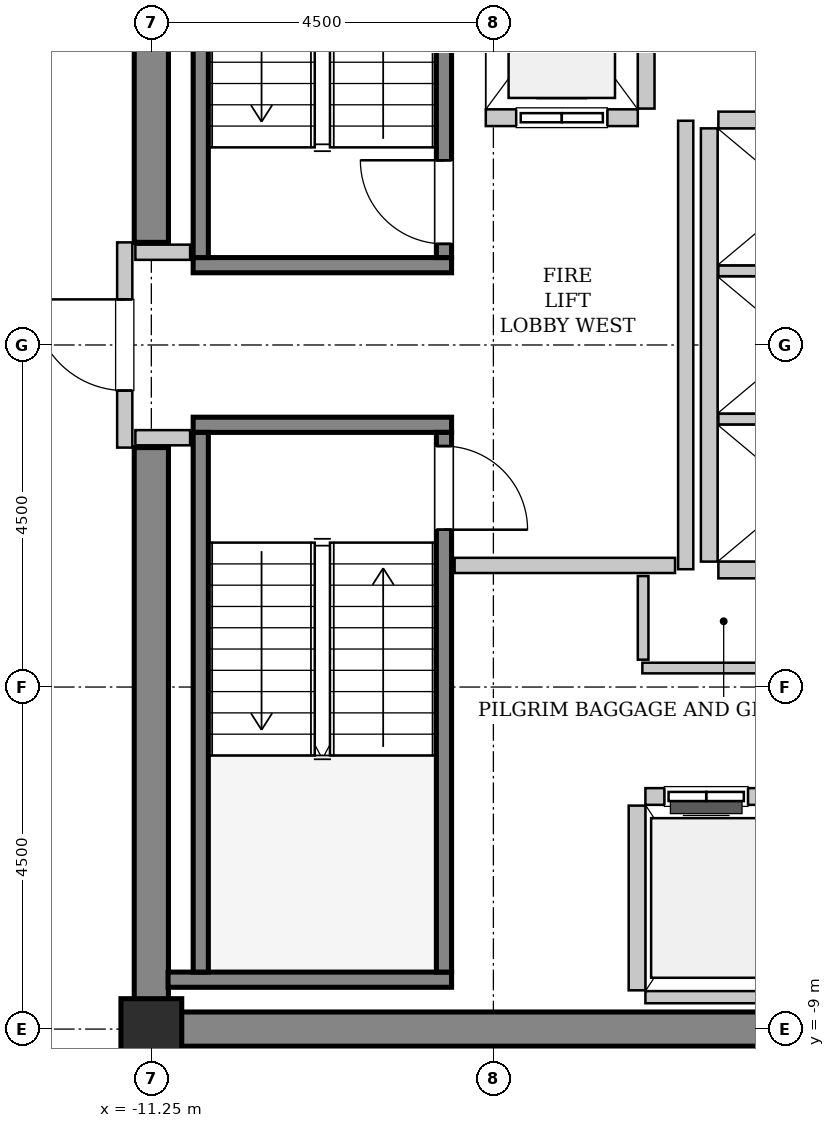
"""IFC4 building model, lengths in metres.
Left out: names, types, materials, properties, quantities, classifications, styles, units other than length and angle.
Written with IfcOpenShell. Run it as: python <this file> out.ifc"""

import sys

from ifc_helpers import new_model, si_unit, direction, frame, frame_2d, origin, origin_2d, place, context, subcontext, project, spatial, rectangle, hollow_rectangle, extrude, source, transform, mapped, element, fill, save


model = new_model("IFC4")
c1 = context("Model", 3, precision=1e-05, world=origin(), true_north=direction((0.0, 1.0)))
c2 = subcontext(c1, "Body", "Model", "MODEL_VIEW")
j1 = project(units=[si_unit("LENGTHUNIT", "METRE"), si_unit("PLANEANGLEUNIT", "RADIAN")], contexts=[c1])
p1 = place(None, origin())
s1 = spatial("IfcSite", under=j1, at=p1, CompositionType="ELEMENT")
p2 = place(p1, origin())
s2 = spatial("IfcBuilding", under=s1, at=p2, CompositionType="ELEMENT")
p3 = place(p2, frame((0.0, 0.0, 210.4)))
s3 = spatial("IfcBuildingStorey", under=s2, at=p3, CompositionType="ELEMENT", Elevation=210.4)
m1 = source(origin(), c2, "Body", "SweptSolid", [
    extrude(rectangle(XDim=9.925, YDim=0.45, at=frame_2d((4.962, 0.0))), origin(), (0.0, 0.0, 1.0), 3.8),
])
p4 = place(p3, frame((-11.475, -9.0, 0.0), z_axis=(0.0, 0.0, 1.0), x_axis=(1.0, 0.0, 0.0)))
e1 = element("IfcWall", 1, at=p4, inside=s3, PredefinedType="SHEAR", context=c2, shape_type="MappedRepresentation", body=[
    mapped(m1, transform((0.0, 0.0, 0.0), x_axis=(1.0, 0.0, 0.0), y_axis=(0.0, 1.0, 0.0), z_axis=(0.0, 0.0, 1.0), scale=1.0)),
])
m2 = source(origin(), c2, "Body", "SweptSolid", [
    extrude(rectangle(XDim=7.425, YDim=0.45, at=frame_2d((3.712, 0.0))), origin(), (0.0, 0.0, 1.0), 3.8),
])
for number, where, z_axis, x_axis in (
    (2, (-11.25, -8.775, 0.0), (0.0, 0.0, 1.0), (0.0, 1.0, 0.0)),
    (3, (-11.25, 1.35, 0.0), (0.0, 0.0, 1.0), (0.0, 1.0, 0.0)),
):
    element("IfcWall", number, at=place(p3, frame(where, z_axis=z_axis, x_axis=x_axis)), inside=s3, PredefinedType="SHEAR", context=c2, shape_type="MappedRepresentation", body=[
        mapped(m2, transform((0.0, 0.0, 0.0), x_axis=(1.0, 0.0, 0.0), y_axis=(0.0, 1.0, 0.0), z_axis=(0.0, 0.0, 1.0), scale=1.0)),
    ])
m3 = source(origin(), c2, "Body", "SweptSolid", [
    extrude(hollow_rectangle(XDim=0.8, YDim=0.8, WallThickness=0.04, InnerFilletRadius=0.04, OuterFilletRadius=0.08, at=origin_2d()), origin(), (0.0, 0.0, 1.0), 3.8),
])
p5 = place(p3, frame((-11.25, -9.0, 0.0), z_axis=(0.0, 0.0, 1.0), x_axis=(1.0, 0.0, 0.0)))
e4 = element("IfcColumn", 4, at=p5, inside=s3, PredefinedType="COLUMN", context=c2, shape_type="MappedRepresentation", body=[
    mapped(m3, transform((0.0, 0.0, 0.0), x_axis=(1.0, 0.0, 0.0), y_axis=(0.0, 1.0, 0.0), z_axis=(0.0, 0.0, 1.0), scale=1.0)),
])
m4 = source(origin(), c2, "Body", "SweptSolid", [
    extrude(rectangle(XDim=3.4, YDim=0.2, at=frame_2d((1.7, 0.0))), origin(), (0.0, 0.0, 1.0), 3.8),
])
p6 = place(p3, frame((-7.3, 1.05, 0.0), z_axis=(0.0, 0.0, 1.0), x_axis=(-1.0, 0.0, 0.0)))
e5 = element("IfcWall", 5, at=p6, inside=s3, PredefinedType="SOLIDWALL", context=c2, shape_type="MappedRepresentation", body=[
    mapped(m4, transform((0.0, 0.0, 0.0), x_axis=(1.0, 0.0, 0.0), y_axis=(0.0, 1.0, 0.0), z_axis=(0.0, 0.0, 1.0), scale=1.0)),
])
m5 = source(origin(), c2, "Body", "SweptSolid", [
    extrude(rectangle(XDim=7.1, YDim=0.2, at=frame_2d((3.55, 0.0))), origin(), (0.0, 0.0, 1.0), 3.8),
])
p7 = place(p3, frame((-7.4, 1.15, 0.0), z_axis=(0.0, 0.0, 1.0), x_axis=(0.0, 1.0, 0.0)))
e6 = element("IfcWall", 6, at=p7, inside=s3, PredefinedType="SOLIDWALL", context=c2, shape_type="MappedRepresentation", body=[
    mapped(m5, transform((0.0, 0.0, 0.0), x_axis=(1.0, 0.0, 0.0), y_axis=(0.0, 1.0, 0.0), z_axis=(0.0, 0.0, 1.0), scale=1.0)),
])
p8 = place(p7, frame((0.18, 0.0, 0.0)))
e7 = element("IfcOpeningElement", 7, at=p8, cuts=e6, PredefinedType="OPENING", context=c2, shape_type="SweptSolid", body=[
    extrude(rectangle(XDim=1.1, YDim=2.15, at=frame_2d((0.55, 1.075))), frame((0.0, 0.11, 0.0), z_axis=(0.0, -1.0, 0.0), x_axis=(1.0, 0.0, 0.0)), (0.0, 0.0, 1.0), 0.22),
])
p9 = place(p3, frame((-10.6, 1.15, 0.0), z_axis=(0.0, 0.0, 1.0), x_axis=(0.0, 1.0, 0.0)))
e8 = element("IfcWall", 8, at=p9, inside=s3, PredefinedType="SOLIDWALL", context=c2, shape_type="MappedRepresentation", body=[
    mapped(m5, transform((0.0, 0.0, 0.0), x_axis=(1.0, 0.0, 0.0), y_axis=(0.0, 1.0, 0.0), z_axis=(0.0, 0.0, 1.0), scale=1.0)),
])
p10 = place(p3, frame((-10.7, -1.05, 0.0), z_axis=(0.0, 0.0, 1.0), x_axis=(1.0, 0.0, 0.0)))
e9 = element("IfcWall", 9, at=p10, inside=s3, PredefinedType="SOLIDWALL", context=c2, shape_type="MappedRepresentation", body=[
    mapped(m4, transform((0.0, 0.0, 0.0), x_axis=(1.0, 0.0, 0.0), y_axis=(0.0, 1.0, 0.0), z_axis=(0.0, 0.0, 1.0), scale=1.0)),
])
m6 = source(origin(), c2, "Body", "SweptSolid", [
    extrude(rectangle(XDim=3.73, YDim=0.2, at=frame_2d((1.865, 0.0))), origin(), (0.0, 0.0, 1.0), 3.8),
])
p11 = place(p3, frame((-11.03, -8.35, 0.0), z_axis=(0.0, 0.0, 1.0), x_axis=(1.0, 0.0, 0.0)))
e10 = element("IfcWall", 10, at=p11, inside=s3, PredefinedType="SOLIDWALL", context=c2, shape_type="MappedRepresentation", body=[
    mapped(m6, transform((0.0, 0.0, 0.0), x_axis=(1.0, 0.0, 0.0), y_axis=(0.0, 1.0, 0.0), z_axis=(0.0, 0.0, 1.0), scale=1.0)),
])
p12 = place(p3, frame((-10.6, -1.15, 0.0), z_axis=(0.0, 0.0, 1.0), x_axis=(0.0, -1.0, 0.0)))
e11 = element("IfcWall", 11, at=p12, inside=s3, PredefinedType="SOLIDWALL", context=c2, shape_type="MappedRepresentation", body=[
    mapped(m5, transform((0.0, 0.0, 0.0), x_axis=(1.0, 0.0, 0.0), y_axis=(0.0, 1.0, 0.0), z_axis=(0.0, 0.0, 1.0), scale=1.0)),
])
p13 = place(p3, frame((-7.4, -1.15, 0.0), z_axis=(0.0, 0.0, 1.0), x_axis=(0.0, -1.0, 0.0)))
e12 = element("IfcWall", 12, at=p13, inside=s3, PredefinedType="SOLIDWALL", context=c2, shape_type="MappedRepresentation", body=[
    mapped(m5, transform((0.0, 0.0, 0.0), x_axis=(1.0, 0.0, 0.0), y_axis=(0.0, 1.0, 0.0), z_axis=(0.0, 0.0, 1.0), scale=1.0)),
])
p14 = place(p13, frame((0.18, 0.0, 0.0)))
e13 = element("IfcOpeningElement", 13, at=p14, cuts=e12, PredefinedType="OPENING", context=c2, shape_type="SweptSolid", body=[
    extrude(rectangle(XDim=1.1, YDim=2.15, at=frame_2d((0.55, 1.075))), frame((0.0, 0.11, 0.0), z_axis=(0.0, -1.0, 0.0), x_axis=(1.0, 0.0, 0.0)), (0.0, 0.0, 1.0), 0.22),
])
m7 = source(origin(), c2, "Body", "SweptSolid", [
    extrude(rectangle(XDim=2.0, YDim=0.22, at=frame_2d((1.0, 0.0))), origin(), (0.0, 0.0, 1.0), 3.535),
])
p15 = place(p3, frame((-6.85, 2.99, 0.0), z_axis=(0.0, 0.0, 1.0), x_axis=(1.0, 0.0, 0.0)))
e14 = element("IfcWall", 14, at=p15, inside=s3, PredefinedType="SOLIDWALL", context=c2, shape_type="MappedRepresentation", body=[
    mapped(m7, transform((0.0, 0.0, 0.0), x_axis=(1.0, 0.0, 0.0), y_axis=(0.0, 1.0, 0.0), z_axis=(0.0, 0.0, 1.0), scale=1.0)),
])
p16 = place(p15, frame((0.4, 0.0, 0.0)))
e15 = element("IfcOpeningElement", 15, at=p16, cuts=e14, PredefinedType="OPENING", context=c2, shape_type="SweptSolid", body=[
    extrude(rectangle(XDim=1.2, YDim=2.2, at=frame_2d((0.6, 1.1))), frame((0.0, 0.12, 0.0), z_axis=(0.0, -1.0, 0.0), x_axis=(1.0, 0.0, 0.0)), (0.0, 0.0, 1.0), 0.24),
])
m8 = source(origin(), c2, "Body", "SweptSolid", [
    extrude(rectangle(XDim=2.68, YDim=0.22, at=frame_2d((1.34, 0.0))), origin(), (0.0, 0.0, 1.0), 3.535),
])
p17 = place(p3, frame((-4.74, 3.11, 0.0), z_axis=(0.0, 0.0, 1.0), x_axis=(0.0, 1.0, 0.0)))
e16 = element("IfcWall", 16, at=p17, inside=s3, PredefinedType="SOLIDWALL", context=c2, shape_type="MappedRepresentation", body=[
    mapped(m8, transform((0.0, 0.0, 0.0), x_axis=(1.0, 0.0, 0.0), y_axis=(0.0, 1.0, 0.0), z_axis=(0.0, 0.0, 1.0), scale=1.0)),
])
m9 = source(origin(), c2, "Body", "SweptSolid", [
    extrude(rectangle(XDim=3.2, YDim=0.22, at=frame_2d((1.6, 0.0))), origin(), (0.0, 0.0, 1.0), 3.535),
])
p18 = place(p3, frame((-1.55, -5.94, 0.0), z_axis=(0.0, 0.0, 1.0), x_axis=(-1.0, 0.0, 0.0)))
e17 = element("IfcWall", 17, at=p18, inside=s3, PredefinedType="SOLIDWALL", context=c2, shape_type="MappedRepresentation", body=[
    mapped(m9, transform((0.0, 0.0, 0.0), x_axis=(1.0, 0.0, 0.0), y_axis=(0.0, 1.0, 0.0), z_axis=(0.0, 0.0, 1.0), scale=1.0)),
])
p19 = place(p18, frame((1.85, 0.0, 0.0)))
e18 = element("IfcOpeningElement", 18, at=p19, cuts=e17, PredefinedType="OPENING", context=c2, shape_type="SweptSolid", body=[
    extrude(rectangle(XDim=1.1, YDim=2.2, at=frame_2d((0.55, 1.1))), frame((0.0, 0.12, 0.0), z_axis=(0.0, -1.0, 0.0), x_axis=(1.0, 0.0, 0.0)), (0.0, 0.0, 1.0), 0.24),
])
p20 = place(p18, frame((0.225, 0.0, 0.0)))
e19 = element("IfcOpeningElement", 19, at=p20, cuts=e17, PredefinedType="OPENING", context=c2, shape_type="SweptSolid", body=[
    extrude(rectangle(XDim=1.1, YDim=2.2, at=frame_2d((0.55, 1.1))), frame((0.0, 0.12, 0.0), z_axis=(0.0, -1.0, 0.0), x_axis=(1.0, 0.0, 0.0)), (0.0, 0.0, 1.0), 0.24),
])
m10 = source(origin(), c2, "Body", "SweptSolid", [
    extrude(rectangle(XDim=3.2, YDim=0.16, at=frame_2d((1.6, 0.0))), origin(), (0.0, 0.0, 1.0), 2.625),
])
p21 = place(p3, frame((-4.75, -8.58, 0.0), z_axis=(0.0, 0.0, 1.0), x_axis=(1.0, 0.0, 0.0)))
e20 = element("IfcWall", 20, at=p21, inside=s3, PredefinedType="PARTITIONING", context=c2, shape_type="MappedRepresentation", body=[
    mapped(m10, transform((0.0, 0.0, 0.0), x_axis=(1.0, 0.0, 0.0), y_axis=(0.0, 1.0, 0.0), z_axis=(0.0, 0.0, 1.0), scale=1.0)),
])
m11 = source(origin(), c2, "Body", "SweptSolid", [
    extrude(rectangle(XDim=2.43, YDim=0.22, at=frame_2d((1.215, 0.0))), origin(), (0.0, 0.0, 1.0), 3.535),
])
p22 = place(p3, frame((-4.86, -6.06, 0.0), z_axis=(0.0, 0.0, 1.0), x_axis=(0.0, -1.0, 0.0)))
e21 = element("IfcWall", 21, at=p22, inside=s3, PredefinedType="SOLIDWALL", context=c2, shape_type="MappedRepresentation", body=[
    mapped(m11, transform((0.0, 0.0, 0.0), x_axis=(1.0, 0.0, 0.0), y_axis=(0.0, 1.0, 0.0), z_axis=(0.0, 0.0, 1.0), scale=1.0)),
])
m12 = source(origin(), c2, "Body", "SweptSolid", [
    extrude(rectangle(XDim=5.7, YDim=0.22, at=frame_2d((2.85, 0.0))), origin(), (0.0, 0.0, 1.0), 3.535),
])
p23 = place(p3, frame((-3.91, 2.85, 0.0), z_axis=(0.0, 0.0, 1.0), x_axis=(0.0, -1.0, 0.0)))
e22 = element("IfcWall", 22, at=p23, inside=s3, PredefinedType="SOLIDWALL", context=c2, shape_type="MappedRepresentation", body=[
    mapped(m12, transform((0.0, 0.0, 0.0), x_axis=(1.0, 0.0, 0.0), y_axis=(0.0, 1.0, 0.0), z_axis=(0.0, 0.0, 1.0), scale=1.0)),
])
m13 = source(origin(), c2, "Body", "SweptSolid", [
    extrude(rectangle(XDim=2.13, YDim=0.22, at=frame_2d((1.065, 0.0))), origin(), (0.0, 0.0, 1.0), 3.535),
])
p24 = place(p3, frame((-3.79, -2.96, 0.0), z_axis=(0.0, 0.0, 1.0), x_axis=(1.0, 0.0, 0.0)))
e23 = element("IfcWall", 23, at=p24, inside=s3, PredefinedType="SOLIDWALL", context=c2, shape_type="MappedRepresentation", body=[
    mapped(m13, transform((0.0, 0.0, 0.0), x_axis=(1.0, 0.0, 0.0), y_axis=(0.0, 1.0, 0.0), z_axis=(0.0, 0.0, 1.0), scale=1.0)),
])
m14 = source(origin(), c2, "Body", "SweptSolid", [
    extrude(rectangle(XDim=2.13, YDim=0.14, at=frame_2d((1.065, 0.0))), origin(), (0.0, 0.0, 1.0), 3.535),
])
for number, where, z_axis, x_axis in (
    (24, (-3.79, -0.975, 0.0), (0.0, 0.0, 1.0), (1.0, 0.0, 0.0)),
    (25, (-3.79, 0.975, 0.0), (0.0, 0.0, 1.0), (1.0, 0.0, 0.0)),
):
    element("IfcWall", number, at=place(p3, frame(where, z_axis=z_axis, x_axis=x_axis)), inside=s3, PredefinedType="PARTITIONING", context=c2, shape_type="MappedRepresentation", body=[
        mapped(m14, transform((0.0, 0.0, 0.0), x_axis=(1.0, 0.0, 0.0), y_axis=(0.0, 1.0, 0.0), z_axis=(0.0, 0.0, 1.0), scale=1.0)),
    ])
p25 = place(p3, frame((-1.66, 2.96, 0.0), z_axis=(0.0, 0.0, 1.0), x_axis=(-1.0, 0.0, 0.0)))
e26 = element("IfcWall", 26, at=p25, inside=s3, PredefinedType="SOLIDWALL", context=c2, shape_type="MappedRepresentation", body=[
    mapped(m13, transform((0.0, 0.0, 0.0), x_axis=(1.0, 0.0, 0.0), y_axis=(0.0, 1.0, 0.0), z_axis=(0.0, 0.0, 1.0), scale=1.0)),
])
m15 = source(origin(), c2, "Body", "SweptSolid", [
    extrude(rectangle(XDim=2.7, YDim=0.2, at=frame_2d((1.35, 0.0))), origin(), (0.0, 0.0, 1.0), 2.625),
])
p26 = place(p3, frame((-11.6, -1.35, 0.0), z_axis=(0.0, 0.0, 1.0), x_axis=(0.0, 1.0, 0.0)))
e27 = element("IfcWall", 27, at=p26, inside=s3, PredefinedType="PARTITIONING", context=c2, shape_type="MappedRepresentation", body=[
    mapped(m15, transform((0.0, 0.0, 0.0), x_axis=(1.0, 0.0, 0.0), y_axis=(0.0, 1.0, 0.0), z_axis=(0.0, 0.0, 1.0), scale=1.0)),
])
p27 = place(p26, frame((0.75, 0.0, 0.0)))
e28 = element("IfcOpeningElement", 28, at=p27, cuts=e27, PredefinedType="OPENING", context=c2, shape_type="SweptSolid", body=[
    extrude(rectangle(XDim=1.2, YDim=2.15, at=frame_2d((0.6, 1.075))), frame((0.0, 0.11, 0.0), z_axis=(0.0, -1.0, 0.0), x_axis=(1.0, 0.0, 0.0)), (0.0, 0.0, 1.0), 0.22),
])
m16 = source(origin(), c2, "Body", "SweptSolid", [
    extrude(rectangle(XDim=5.9, YDim=0.2, at=frame_2d((2.95, 0.0))), origin(), (0.0, 0.0, 1.0), 3.535),
])
p28 = place(p3, frame((-4.22, -2.95, 0.0), z_axis=(0.0, 0.0, 1.0), x_axis=(0.0, 1.0, 0.0)))
e29 = element("IfcWall", 29, at=p28, inside=s3, PredefinedType="PARTITIONING", context=c2, shape_type="MappedRepresentation", body=[
    mapped(m16, transform((0.0, 0.0, 0.0), x_axis=(1.0, 0.0, 0.0), y_axis=(0.0, 1.0, 0.0), z_axis=(0.0, 0.0, 1.0), scale=1.0)),
])
m17 = source(origin(), c2, "Body", "SweptSolid", [
    extrude(rectangle(XDim=2.9, YDim=0.2, at=frame_2d((1.45, 0.0))), origin(), (0.0, 0.0, 1.0), 3.535),
])
p29 = place(p3, frame((-7.26, -2.9, 0.0), z_axis=(0.0, 0.0, 1.0), x_axis=(1.0, 0.0, 0.0)))
e30 = element("IfcWall", 30, at=p29, inside=s3, PredefinedType="PARTITIONING", context=c2, shape_type="MappedRepresentation", body=[
    mapped(m17, transform((0.0, 0.0, 0.0), x_axis=(1.0, 0.0, 0.0), y_axis=(0.0, 1.0, 0.0), z_axis=(0.0, 0.0, 1.0), scale=1.0)),
])
m18 = source(origin(), c2, "Body", "SweptSolid", [
    extrude(rectangle(XDim=0.72, YDim=0.2, at=frame_2d((0.36, 0.0))), origin(), (0.0, 0.0, 1.0), 3.535),
])
for number, where, z_axis, x_axis in (
    (31, (-11.46, 1.22, 0.0), (0.0, 0.0, 1.0), (1.0, 0.0, 0.0)),
    (32, (-11.46, -1.22, 0.0), (0.0, 0.0, 1.0), (1.0, 0.0, 0.0)),
):
    element("IfcWall", number, at=place(p3, frame(where, z_axis=z_axis, x_axis=x_axis)), inside=s3, PredefinedType="PARTITIONING", context=c2, shape_type="MappedRepresentation", body=[
        mapped(m18, transform((0.0, 0.0, 0.0), x_axis=(1.0, 0.0, 0.0), y_axis=(0.0, 1.0, 0.0), z_axis=(0.0, 0.0, 1.0), scale=1.0)),
    ])
m19 = source(origin(), c2, "Body", "SweptSolid", [
    extrude(rectangle(XDim=3.15, YDim=0.14, at=frame_2d((1.575, 0.0))), origin(), (0.0, 0.0, 1.0), 3.535),
])
p30 = place(p3, frame((-4.79, -4.25, 0.0), z_axis=(0.0, 0.0, 1.0), x_axis=(1.0, 0.0, 0.0)))
e33 = element("IfcWall", 33, at=p30, inside=s3, PredefinedType="PARTITIONING", context=c2, shape_type="MappedRepresentation", body=[
    mapped(m19, transform((0.0, 0.0, 0.0), x_axis=(1.0, 0.0, 0.0), y_axis=(0.0, 1.0, 0.0), z_axis=(0.0, 0.0, 1.0), scale=1.0)),
])
m20 = source(origin(), c2, "Body", "SweptSolid", [
    extrude(rectangle(XDim=1.1, YDim=0.14, at=frame_2d((0.55, 0.0))), origin(), (0.0, 0.0, 1.0), 3.535),
])
p31 = place(p3, frame((-4.78, -4.14, 0.0), z_axis=(0.0, 0.0, 1.0), x_axis=(0.0, 1.0, 0.0)))
e34 = element("IfcWall", 34, at=p31, inside=s3, PredefinedType="PARTITIONING", context=c2, shape_type="MappedRepresentation", body=[
    mapped(m20, transform((0.0, 0.0, 0.0), x_axis=(1.0, 0.0, 0.0), y_axis=(0.0, 1.0, 0.0), z_axis=(0.0, 0.0, 1.0), scale=1.0)),
])
m21 = source(origin(), c2, "Body", "SweptSolid", [
    extrude(rectangle(XDim=1.1, YDim=2.15, at=frame_2d((0.55, 1.075))), frame((0.0, 0.025, 0.0), z_axis=(0.0, -1.0, 0.0), x_axis=(1.0, 0.0, 0.0)), (0.0, 0.0, 1.0), 0.05),
])
p32 = place(p8, origin())
e35 = element("IfcDoor", 35, at=p32, inside=s3, OperationType="SINGLE_SWING_RIGHT", PredefinedType="DOOR", context=c2, shape_type="MappedRepresentation", body=[
    mapped(m21, transform((0.0, 0.0, 0.0), x_axis=(1.0, 0.0, 0.0), y_axis=(0.0, 1.0, 0.0), z_axis=(0.0, 0.0, 1.0), scale=1.0)),
])
fill(e7, e35)
p33 = place(p14, origin())
e36 = element("IfcDoor", 36, at=p33, inside=s3, OperationType="SINGLE_SWING_RIGHT", PredefinedType="DOOR", context=c2, shape_type="MappedRepresentation", body=[
    mapped(m21, transform((0.0, 0.0, 0.0), x_axis=(1.0, 0.0, 0.0), y_axis=(0.0, 1.0, 0.0), z_axis=(0.0, 0.0, 1.0), scale=1.0)),
])
fill(e13, e36)
m22 = source(origin(), c2, "Body", "SweptSolid", [
    extrude(rectangle(XDim=1.2, YDim=2.2, at=frame_2d((0.6, 1.1))), frame((0.0, 0.025, 0.0), z_axis=(0.0, -1.0, 0.0), x_axis=(1.0, 0.0, 0.0)), (0.0, 0.0, 1.0), 0.05),
])
p34 = place(p16, origin())
e37 = element("IfcDoor", 37, at=p34, inside=s3, OperationType="SLIDING_TO_LEFT", PredefinedType="DOOR", context=c2, shape_type="MappedRepresentation", body=[
    mapped(m22, transform((0.0, 0.0, 0.0), x_axis=(1.0, 0.0, 0.0), y_axis=(0.0, 1.0, 0.0), z_axis=(0.0, 0.0, 1.0), scale=1.0)),
])
fill(e15, e37)
m23 = source(origin(), c2, "Body", "SweptSolid", [
    extrude(rectangle(XDim=1.1, YDim=2.2, at=frame_2d((0.55, 1.1))), frame((0.0, 0.025, 0.0), z_axis=(0.0, -1.0, 0.0), x_axis=(1.0, 0.0, 0.0)), (0.0, 0.0, 1.0), 0.05),
])
p35 = place(p19, origin())
e38 = element("IfcDoor", 38, at=p35, inside=s3, OperationType="DOUBLE_DOOR_SLIDING", PredefinedType="DOOR", context=c2, shape_type="MappedRepresentation", body=[
    mapped(m23, transform((0.0, 0.0, 0.0), x_axis=(1.0, 0.0, 0.0), y_axis=(0.0, 1.0, 0.0), z_axis=(0.0, 0.0, 1.0), scale=1.0)),
])
fill(e18, e38)
m24 = source(origin(), c2, "Body", "SweptSolid", [
    extrude(rectangle(XDim=1.2, YDim=2.15, at=frame_2d((0.6, 1.075))), frame((0.0, 0.025, 0.0), z_axis=(0.0, -1.0, 0.0), x_axis=(1.0, 0.0, 0.0)), (0.0, 0.0, 1.0), 0.05),
])
p36 = place(p27, origin())
e39 = element("IfcDoor", 39, at=p36, inside=s3, OperationType="SINGLE_SWING_RIGHT", PredefinedType="DOOR", context=c2, shape_type="MappedRepresentation", body=[
    mapped(m24, transform((0.0, 0.0, 0.0), x_axis=(1.0, 0.0, 0.0), y_axis=(0.0, 1.0, 0.0), z_axis=(0.0, 0.0, 1.0), scale=1.0)),
])
fill(e28, e39)
save(model, sys.argv[1])
